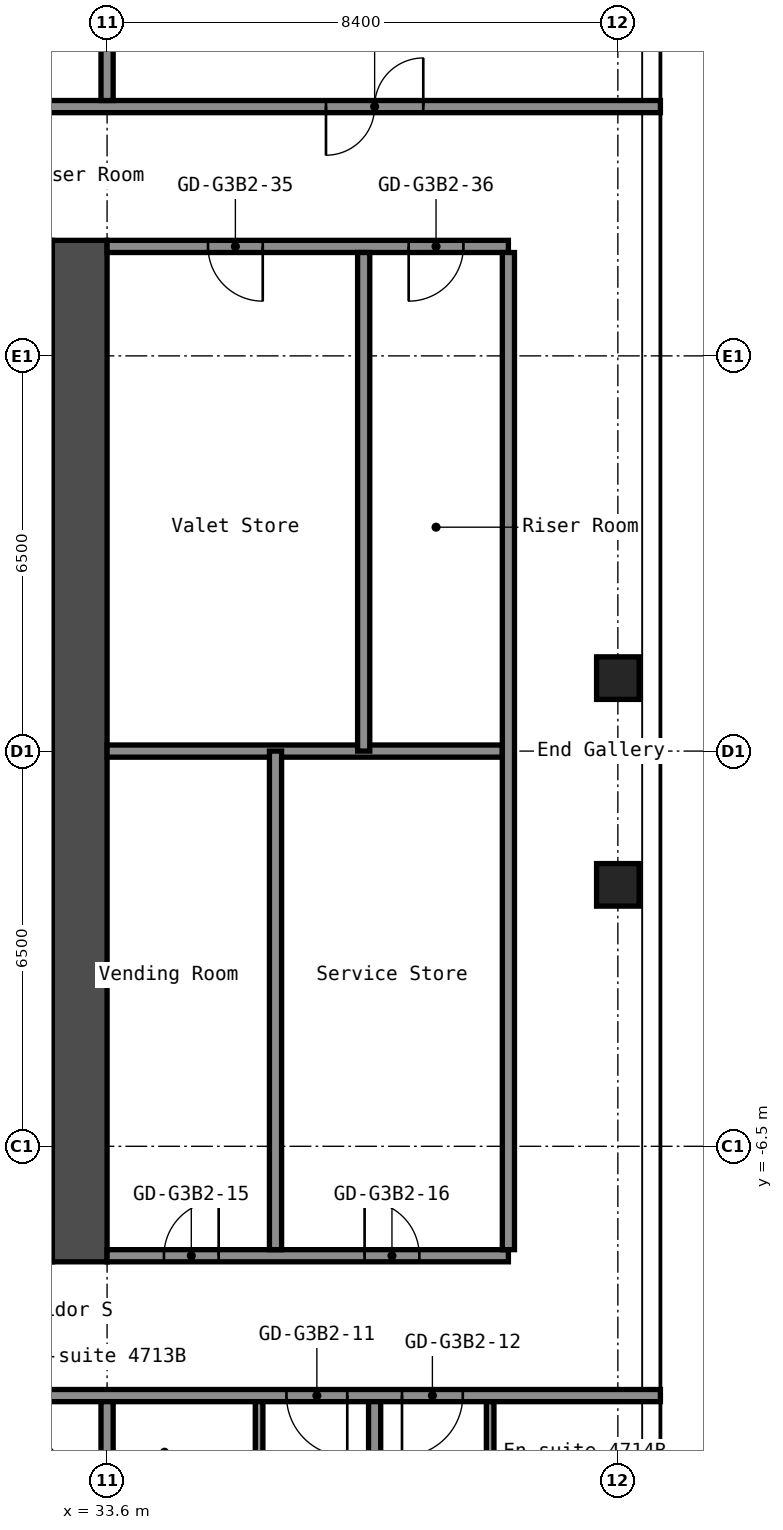
"""IFC4 building model, lengths in metres.
Left out: names, types, materials, properties, quantities, classifications, styles, units other than length and angle.
Written with IfcOpenShell. Run it as: python <this file> out.ifc"""

import sys

from ifc_helpers import new_model, si_unit, direction, frame, frame_2d, origin, origin_2d, place, context, subcontext, project, spatial, rectangle, hollow_rectangle, extrude, element, fill, save


model = new_model("IFC4")
c1 = context("Model", 3, precision=1e-05, world=origin(), true_north=direction((0.0, 1.0)))
c2 = subcontext(c1, "Body", "Model", "MODEL_VIEW")
j1 = project(units=[si_unit("LENGTHUNIT", "METRE"), si_unit("PLANEANGLEUNIT", "RADIAN")], contexts=[c1])
p1 = place(None, origin())
s1 = spatial("IfcSite", under=j1, at=p1, CompositionType="ELEMENT")
p2 = place(p1, origin())
s2 = spatial("IfcBuilding", under=s1, at=p2, CompositionType="ELEMENT")
p3 = place(p2, frame((0.0, 0.0, 166.2)))
s3 = spatial("IfcBuildingStorey", under=s2, at=p3, CompositionType="ELEMENT", Elevation=166.2)
for number, where, z_axis, x_axis in (
    (1, (42.0, -2.2, 0.0), (0.0, 0.0, 1.0), (1.0, 0.0, 0.0)),
    (2, (42.0, 1.2, 0.0), (0.0, 0.0, 1.0), (1.0, 0.0, 0.0)),
):
    element("IfcColumn", number, at=place(p3, frame(where, z_axis=z_axis, x_axis=x_axis)), inside=s3, PredefinedType="COLUMN", context=c2, shape_type="SweptSolid", body=[
        extrude(hollow_rectangle(XDim=0.7, YDim=0.7, WallThickness=0.028, at=origin_2d()), origin(), (0.0, 0.0, 1.0), 2.75),
    ])
p4 = place(p3, frame((33.15, -8.4, 0.0), z_axis=(0.0, 0.0, 1.0), x_axis=(0.0, 1.0, 0.0)))
e3 = element("IfcWall", 3, at=p4, inside=s3, PredefinedType="SHEAR", context=c2, shape_type="SweptSolid", body=[
    extrude(rectangle(XDim=16.8, YDim=0.9, at=frame_2d((8.4, 0.0))), origin(), (0.0, 0.0, 1.0), 2.75),
])
p5 = place(p3, frame((16.8, -10.6, 0.0), z_axis=(0.0, 0.0, 1.0), x_axis=(1.0, 0.0, 0.0)))
e4 = element("IfcWall", 4, at=p5, inside=s3, PredefinedType="PARTITIONING", context=c2, shape_type="SweptSolid", body=[
    extrude(rectangle(XDim=25.9, YDim=0.2, at=frame_2d((12.95, 0.0))), origin(), (0.0, 0.0, 1.0), 2.75),
])
p6 = place(p5, frame((2.85, 0.0, 0.0)))
e5 = element("IfcOpeningElement", 5, at=p6, cuts=e4, PredefinedType="OPENING", context=c2, shape_type="SweptSolid", body=[
    extrude(rectangle(XDim=1.0, YDim=2.1, at=frame_2d((0.5, 1.05))), frame((0.0, 0.11, 0.0), z_axis=(0.0, -1.0, 0.0), x_axis=(1.0, 0.0, 0.0)), (0.0, 0.0, 1.0), 0.22),
])
p7 = place(p5, frame((4.55, 0.0, 0.0)))
e6 = element("IfcOpeningElement", 6, at=p7, cuts=e4, PredefinedType="OPENING", context=c2, shape_type="SweptSolid", body=[
    extrude(rectangle(XDim=1.0, YDim=2.1, at=frame_2d((0.5, 1.05))), frame((0.0, 0.11, 0.0), z_axis=(0.0, -1.0, 0.0), x_axis=(1.0, 0.0, 0.0)), (0.0, 0.0, 1.0), 0.22),
])
p8 = place(p5, frame((11.25, 0.0, 0.0)))
e7 = element("IfcOpeningElement", 7, at=p8, cuts=e4, PredefinedType="OPENING", context=c2, shape_type="SweptSolid", body=[
    extrude(rectangle(XDim=1.0, YDim=2.1, at=frame_2d((0.5, 1.05))), frame((0.0, 0.11, 0.0), z_axis=(0.0, -1.0, 0.0), x_axis=(1.0, 0.0, 0.0)), (0.0, 0.0, 1.0), 0.22),
])
p9 = place(p5, frame((12.95, 0.0, 0.0)))
e8 = element("IfcOpeningElement", 8, at=p9, cuts=e4, PredefinedType="OPENING", context=c2, shape_type="SweptSolid", body=[
    extrude(rectangle(XDim=1.0, YDim=2.1, at=frame_2d((0.5, 1.05))), frame((0.0, 0.11, 0.0), z_axis=(0.0, -1.0, 0.0), x_axis=(1.0, 0.0, 0.0)), (0.0, 0.0, 1.0), 0.22),
])
p10 = place(p5, frame((19.75, 0.0, 0.0)))
e9 = element("IfcOpeningElement", 9, at=p10, cuts=e4, PredefinedType="OPENING", context=c2, shape_type="SweptSolid", body=[
    extrude(rectangle(XDim=1.0, YDim=2.1, at=frame_2d((0.5, 1.05))), frame((0.0, 0.11, 0.0), z_axis=(0.0, -1.0, 0.0), x_axis=(1.0, 0.0, 0.0)), (0.0, 0.0, 1.0), 0.22),
])
p11 = place(p5, frame((21.65, 0.0, 0.0)))
e10 = element("IfcOpeningElement", 10, at=p11, cuts=e4, PredefinedType="OPENING", context=c2, shape_type="SweptSolid", body=[
    extrude(rectangle(XDim=1.0, YDim=2.1, at=frame_2d((0.5, 1.05))), frame((0.0, 0.11, 0.0), z_axis=(0.0, -1.0, 0.0), x_axis=(1.0, 0.0, 0.0)), (0.0, 0.0, 1.0), 0.22),
])
p12 = place(p3, frame((33.6, -8.3, 0.0), z_axis=(0.0, 0.0, 1.0), x_axis=(1.0, 0.0, 0.0)))
e11 = element("IfcWall", 11, at=p12, inside=s3, PredefinedType="PARTITIONING", context=c2, shape_type="SweptSolid", body=[
    extrude(rectangle(XDim=6.6, YDim=0.2, at=frame_2d((3.3, 0.0))), origin(), (0.0, 0.0, 1.0), 2.75),
])
p13 = place(p12, frame((0.935, 0.0, 0.0)))
e12 = element("IfcOpeningElement", 12, at=p13, cuts=e11, PredefinedType="OPENING", context=c2, shape_type="SweptSolid", body=[
    extrude(rectangle(XDim=0.9, YDim=2.1, at=frame_2d((0.45, 1.05))), frame((0.0, 0.11, 0.0), z_axis=(0.0, -1.0, 0.0), x_axis=(1.0, 0.0, 0.0)), (0.0, 0.0, 1.0), 0.22),
])
p14 = place(p12, frame((4.235, 0.0, 0.0)))
e13 = element("IfcOpeningElement", 13, at=p14, cuts=e11, PredefinedType="OPENING", context=c2, shape_type="SweptSolid", body=[
    extrude(rectangle(XDim=0.9, YDim=2.1, at=frame_2d((0.45, 1.05))), frame((0.0, 0.11, 0.0), z_axis=(0.0, -1.0, 0.0), x_axis=(1.0, 0.0, 0.0)), (0.0, 0.0, 1.0), 0.22),
])
p15 = place(p3, frame((33.6, 0.0, 0.0), z_axis=(0.0, 0.0, 1.0), x_axis=(1.0, 0.0, 0.0)))
e14 = element("IfcWall", 14, at=p15, inside=s3, PredefinedType="PARTITIONING", context=c2, shape_type="SweptSolid", body=[
    extrude(rectangle(XDim=6.5, YDim=0.2, at=frame_2d((3.25, 0.0))), origin(), (0.0, 0.0, 1.0), 2.75),
])
p16 = place(p3, frame((33.6, 8.3, 0.0), z_axis=(0.0, 0.0, 1.0), x_axis=(1.0, 0.0, 0.0)))
e15 = element("IfcWall", 15, at=p16, inside=s3, PredefinedType="PARTITIONING", context=c2, shape_type="SweptSolid", body=[
    extrude(rectangle(XDim=6.6, YDim=0.2, at=frame_2d((3.3, 0.0))), origin(), (0.0, 0.0, 1.0), 2.75),
])
p17 = place(p16, frame((1.66, 0.0, 0.0)))
e16 = element("IfcOpeningElement", 16, at=p17, cuts=e15, PredefinedType="OPENING", context=c2, shape_type="SweptSolid", body=[
    extrude(rectangle(XDim=0.9, YDim=2.1, at=frame_2d((0.45, 1.05))), frame((0.0, 0.11, 0.0), z_axis=(0.0, -1.0, 0.0), x_axis=(1.0, 0.0, 0.0)), (0.0, 0.0, 1.0), 0.22),
])
p18 = place(p16, frame((4.96, 0.0, 0.0)))
e17 = element("IfcOpeningElement", 17, at=p18, cuts=e15, PredefinedType="OPENING", context=c2, shape_type="SweptSolid", body=[
    extrude(rectangle(XDim=0.9, YDim=2.1, at=frame_2d((0.45, 1.05))), frame((0.0, 0.11, 0.0), z_axis=(0.0, -1.0, 0.0), x_axis=(1.0, 0.0, 0.0)), (0.0, 0.0, 1.0), 0.22),
])
p19 = place(p3, frame((16.8, 10.6, 0.0), z_axis=(0.0, 0.0, 1.0), x_axis=(1.0, 0.0, 0.0)))
e18 = element("IfcWall", 18, at=p19, inside=s3, PredefinedType="PARTITIONING", context=c2, shape_type="SweptSolid", body=[
    extrude(rectangle(XDim=25.9, YDim=0.2, at=frame_2d((12.95, 0.0))), origin(), (0.0, 0.0, 1.0), 2.75),
])
p20 = place(p19, frame((3.4, 0.0, 0.0)))
e19 = element("IfcOpeningElement", 19, at=p20, cuts=e18, PredefinedType="OPENING", context=c2, shape_type="SweptSolid", body=[
    extrude(rectangle(XDim=1.6, YDim=2.1, at=frame_2d((0.8, 1.05))), frame((0.0, 0.11, 0.0), z_axis=(0.0, -1.0, 0.0), x_axis=(1.0, 0.0, 0.0)), (0.0, 0.0, 1.0), 0.22),
])
p21 = place(p19, frame((11.8, 0.0, 0.0)))
e20 = element("IfcOpeningElement", 20, at=p21, cuts=e18, PredefinedType="OPENING", context=c2, shape_type="SweptSolid", body=[
    extrude(rectangle(XDim=1.6, YDim=2.1, at=frame_2d((0.8, 1.05))), frame((0.0, 0.11, 0.0), z_axis=(0.0, -1.0, 0.0), x_axis=(1.0, 0.0, 0.0)), (0.0, 0.0, 1.0), 0.22),
])
p22 = place(p19, frame((20.4, 0.0, 0.0)))
e21 = element("IfcOpeningElement", 21, at=p22, cuts=e18, PredefinedType="OPENING", context=c2, shape_type="SweptSolid", body=[
    extrude(rectangle(XDim=1.6, YDim=2.1, at=frame_2d((0.8, 1.05))), frame((0.0, 0.11, 0.0), z_axis=(0.0, -1.0, 0.0), x_axis=(1.0, 0.0, 0.0)), (0.0, 0.0, 1.0), 0.22),
])
p23 = place(p3, frame((33.6, -19.3, 0.0), z_axis=(0.0, 0.0, 1.0), x_axis=(0.0, 1.0, 0.0)))
e22 = element("IfcWall", 22, at=p23, inside=s3, PredefinedType="PARTITIONING", context=c2, shape_type="SweptSolid", body=[
    extrude(rectangle(XDim=8.6, YDim=0.2, at=frame_2d((4.3, 0.0))), origin(), (0.0, 0.0, 1.0), 2.75),
])
p24 = place(p3, frame((33.6, 10.7, 0.0), z_axis=(0.0, 0.0, 1.0), x_axis=(0.0, 1.0, 0.0)))
e23 = element("IfcWall", 23, at=p24, inside=s3, PredefinedType="PARTITIONING", context=c2, shape_type="SweptSolid", body=[
    extrude(rectangle(XDim=7.6, YDim=0.2, at=frame_2d((3.8, 0.0))), origin(), (0.0, 0.0, 1.0), 2.75),
])
p25 = place(p3, frame((36.1, -13.6, 0.0), z_axis=(0.0, 0.0, 1.0), x_axis=(0.0, 1.0, 0.0)))
e24 = element("IfcWall", 24, at=p25, inside=s3, PredefinedType="PARTITIONING", context=c2, shape_type="SweptSolid", body=[
    extrude(rectangle(XDim=2.9, YDim=0.125, at=frame_2d((1.45, 0.0))), origin(), (0.0, 0.0, 1.0), 2.75),
])
p26 = place(p25, frame((0.6, 0.0, 0.0)))
e25 = element("IfcOpeningElement", 25, at=p26, cuts=e24, PredefinedType="OPENING", context=c2, shape_type="SweptSolid", body=[
    extrude(rectangle(XDim=0.8, YDim=2.1, at=frame_2d((0.4, 1.05))), frame((0.0, 0.073, 0.0), z_axis=(0.0, -1.0, 0.0), x_axis=(1.0, 0.0, 0.0)), (0.0, 0.0, 1.0), 0.145),
])
for number, where, z_axis, x_axis in (
    (26, (36.37, -8.2, 0.0), (0.0, 0.0, 1.0), (0.0, 1.0, 0.0)),
    (27, (37.82, 0.0, 0.0), (0.0, 0.0, 1.0), (0.0, 1.0, 0.0)),
):
    element("IfcWall", number, at=place(p3, frame(where, z_axis=z_axis, x_axis=x_axis)), inside=s3, PredefinedType="PARTITIONING", context=c2, shape_type="SweptSolid", body=[
        extrude(rectangle(XDim=8.2, YDim=0.2, at=frame_2d((4.1, 0.0))), origin(), (0.0, 0.0, 1.0), 2.75),
    ])
p27 = place(p3, frame((38.0, -19.3, 0.0), z_axis=(0.0, 0.0, 1.0), x_axis=(0.0, 1.0, 0.0)))
e28 = element("IfcWall", 28, at=p27, inside=s3, PredefinedType="PARTITIONING", context=c2, shape_type="SweptSolid", body=[
    extrude(rectangle(XDim=8.6, YDim=0.2, at=frame_2d((4.3, 0.0))), origin(), (0.0, 0.0, 1.0), 2.75),
])
p28 = place(p3, frame((39.9, -13.6, 0.0), z_axis=(0.0, 0.0, 1.0), x_axis=(0.0, 1.0, 0.0)))
e29 = element("IfcWall", 29, at=p28, inside=s3, PredefinedType="PARTITIONING", context=c2, shape_type="SweptSolid", body=[
    extrude(rectangle(XDim=2.9, YDim=0.125, at=frame_2d((1.45, 0.0))), origin(), (0.0, 0.0, 1.0), 2.75),
])
p29 = place(p28, frame((0.6, 0.0, 0.0)))
e30 = element("IfcOpeningElement", 30, at=p29, cuts=e29, PredefinedType="OPENING", context=c2, shape_type="SweptSolid", body=[
    extrude(rectangle(XDim=0.8, YDim=2.1, at=frame_2d((0.4, 1.05))), frame((0.0, 0.073, 0.0), z_axis=(0.0, -1.0, 0.0), x_axis=(1.0, 0.0, 0.0)), (0.0, 0.0, 1.0), 0.145),
])
p30 = place(p3, frame((40.2, -8.2, 0.0), z_axis=(0.0, 0.0, 1.0), x_axis=(0.0, 1.0, 0.0)))
e31 = element("IfcWall", 31, at=p30, inside=s3, PredefinedType="PARTITIONING", context=c2, shape_type="SweptSolid", body=[
    extrude(rectangle(XDim=16.4, YDim=0.2, at=frame_2d((8.2, 0.0))), origin(), (0.0, 0.0, 1.0), 2.75),
])
p31 = place(p10, origin())
e32 = element("IfcDoor", 32, at=p31, inside=s3, OperationType="SINGLE_SWING_RIGHT", PredefinedType="DOOR", context=c2, shape_type="SweptSolid", body=[
    extrude(rectangle(XDim=1.0, YDim=2.1, at=frame_2d((0.5, 1.05))), frame((0.0, 0.025, 0.0), z_axis=(0.0, -1.0, 0.0), x_axis=(1.0, 0.0, 0.0)), (0.0, 0.0, 1.0), 0.05),
])
fill(e9, e32)
p32 = place(p11, origin())
e33 = element("IfcDoor", 33, at=p32, inside=s3, OperationType="SINGLE_SWING_LEFT", PredefinedType="DOOR", context=c2, shape_type="SweptSolid", body=[
    extrude(rectangle(XDim=1.0, YDim=2.1, at=frame_2d((0.5, 1.05))), frame((0.0, 0.025, 0.0), z_axis=(0.0, -1.0, 0.0), x_axis=(1.0, 0.0, 0.0)), (0.0, 0.0, 1.0), 0.05),
])
fill(e10, e33)
p33 = place(p13, origin())
e34 = element("IfcDoor", 34, at=p33, inside=s3, OperationType="SINGLE_SWING_LEFT", PredefinedType="DOOR", context=c2, shape_type="SweptSolid", body=[
    extrude(rectangle(XDim=0.9, YDim=2.1, at=frame_2d((0.45, 1.05))), frame((0.0, 0.025, 0.0), z_axis=(0.0, -1.0, 0.0), x_axis=(1.0, 0.0, 0.0)), (0.0, 0.0, 1.0), 0.05),
])
fill(e12, e34)
p34 = place(p14, origin())
e35 = element("IfcDoor", 35, at=p34, inside=s3, OperationType="SINGLE_SWING_RIGHT", PredefinedType="DOOR", context=c2, shape_type="SweptSolid", body=[
    extrude(rectangle(XDim=0.9, YDim=2.1, at=frame_2d((0.45, 1.05))), frame((0.0, 0.025, 0.0), z_axis=(0.0, -1.0, 0.0), x_axis=(1.0, 0.0, 0.0)), (0.0, 0.0, 1.0), 0.05),
])
fill(e13, e35)
p35 = place(p17, origin())
e36 = element("IfcDoor", 36, at=p35, inside=s3, OperationType="SINGLE_SWING_RIGHT", PredefinedType="DOOR", context=c2, shape_type="SweptSolid", body=[
    extrude(rectangle(XDim=0.9, YDim=2.1, at=frame_2d((0.45, 1.05))), frame((0.0, 0.025, 0.0), z_axis=(0.0, -1.0, 0.0), x_axis=(1.0, 0.0, 0.0)), (0.0, 0.0, 1.0), 0.05),
])
fill(e16, e36)
p36 = place(p18, origin())
e37 = element("IfcDoor", 37, at=p36, inside=s3, OperationType="SINGLE_SWING_LEFT", PredefinedType="DOOR", context=c2, shape_type="SweptSolid", body=[
    extrude(rectangle(XDim=0.9, YDim=2.1, at=frame_2d((0.45, 1.05))), frame((0.0, 0.025, 0.0), z_axis=(0.0, -1.0, 0.0), x_axis=(1.0, 0.0, 0.0)), (0.0, 0.0, 1.0), 0.05),
])
fill(e17, e37)
p37 = place(p22, origin())
e38 = element("IfcDoor", 38, at=p37, inside=s3, OperationType="DOUBLE_DOOR_SINGLE_SWING", PredefinedType="DOOR", context=c2, shape_type="SweptSolid", body=[
    extrude(rectangle(XDim=1.6, YDim=2.1, at=frame_2d((0.8, 1.05))), frame((0.0, 0.025, 0.0), z_axis=(0.0, -1.0, 0.0), x_axis=(1.0, 0.0, 0.0)), (0.0, 0.0, 1.0), 0.05),
])
fill(e21, e38)
save(model, sys.argv[1])
